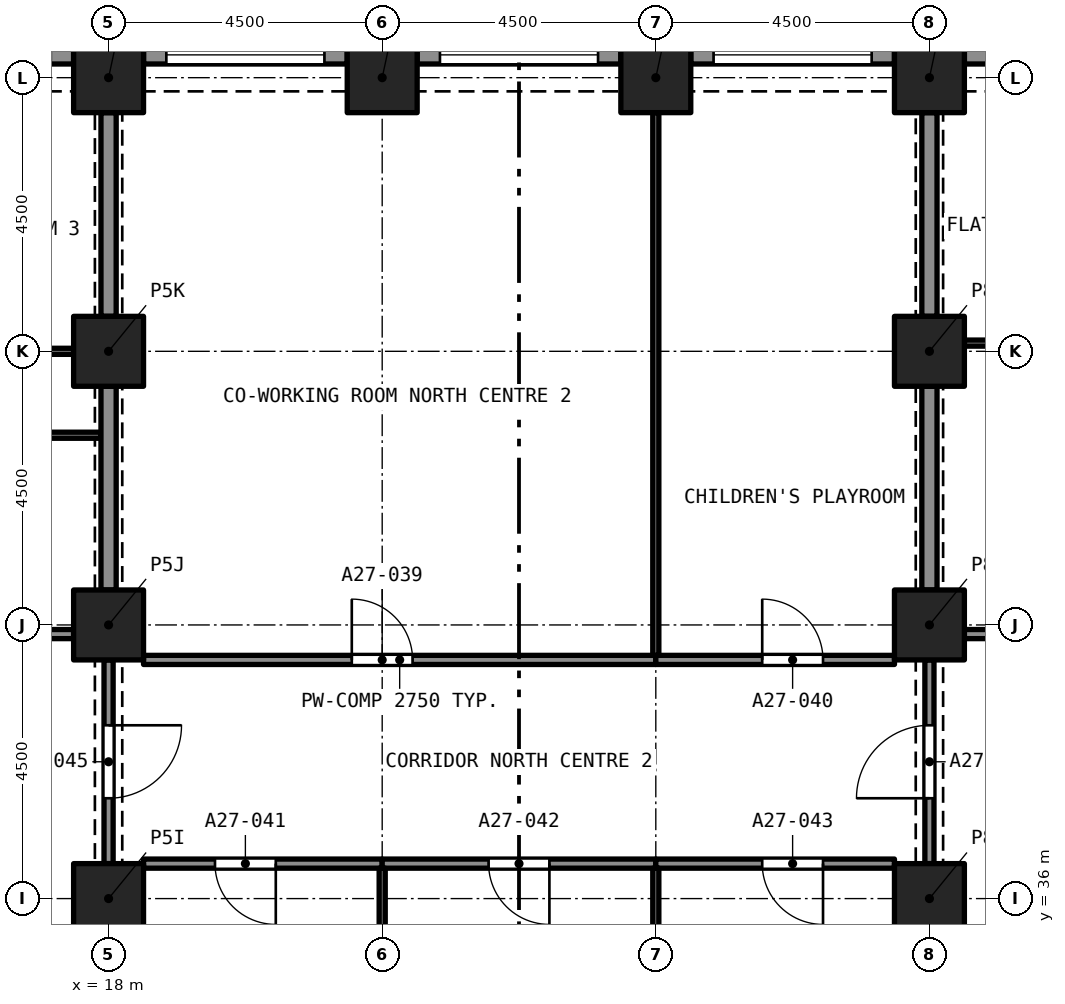
"""IFC4 building model, lengths in metres.
Left out: names, types, materials, properties, quantities, classifications, styles, units other than length and angle.
Written with IfcOpenShell. Run it as: python <this file> out.ifc"""

import sys

from ifc_helpers import new_model, si_unit, direction, frame, frame_2d, origin, origin_2d, place, context, subcontext, project, spatial, rectangle, extrude, element, fill, save


model = new_model("IFC4")
c1 = context("Model", 3, precision=1e-05, world=origin(), true_north=direction((0.0, 1.0)))
c2 = subcontext(c1, "Body", "Model", "MODEL_VIEW")
j1 = project(units=[si_unit("LENGTHUNIT", "METRE"), si_unit("PLANEANGLEUNIT", "RADIAN")], contexts=[c1])
p1 = place(None, origin())
s1 = spatial("IfcSite", under=j1, at=p1, CompositionType="ELEMENT")
p2 = place(p1, origin())
s2 = spatial("IfcBuilding", under=s1, at=p2, CompositionType="ELEMENT")
p3 = place(p2, frame((0.0, 0.0, 99.2)))
s3 = spatial("IfcBuildingStorey", under=s2, at=p3, CompositionType="ELEMENT", Elevation=99.2)
for number, where, z_axis, x_axis in (
    (1, (18.0, 36.0, 0.0), (0.0, 0.0, 1.0), (1.0, 0.0, 0.0)),
    (2, (31.5, 36.0, 0.0), (0.0, 0.0, 1.0), (1.0, 0.0, 0.0)),
    (3, (18.0, 40.5, 0.0), (0.0, 0.0, 1.0), (1.0, 0.0, 0.0)),
    (4, (31.5, 40.5, 0.0), (0.0, 0.0, 1.0), (1.0, 0.0, 0.0)),
    (5, (18.0, 45.0, 0.0), (0.0, 0.0, 1.0), (1.0, 0.0, 0.0)),
    (6, (31.5, 45.0, 0.0), (0.0, 0.0, 1.0), (1.0, 0.0, 0.0)),
    (7, (18.0, 49.5, 0.0), (0.0, 0.0, 1.0), (1.0, 0.0, 0.0)),
    (8, (22.5, 49.5, 0.0), (0.0, 0.0, 1.0), (1.0, 0.0, 0.0)),
    (9, (27.0, 49.5, 0.0), (0.0, 0.0, 1.0), (1.0, 0.0, 0.0)),
    (10, (31.5, 49.5, 0.0), (0.0, 0.0, 1.0), (1.0, 0.0, 0.0)),
):
    element("IfcColumn", number, at=place(p3, frame(where, z_axis=z_axis, x_axis=x_axis)), inside=s3, PredefinedType="COLUMN", context=c2, shape_type="SweptSolid", body=[
        extrude(rectangle(XDim=1.15, YDim=1.15, at=origin_2d()), origin(), (0.0, 0.0, 1.0), 3.2),
    ])
p4 = place(p3, frame((32.075, 49.875, 0.0), z_axis=(0.0, 0.0, 1.0), x_axis=(1.0, 0.0, 0.0)))
e11 = element("IfcWall", 11, at=p4, inside=s3, PredefinedType="SOLIDWALL", context=c2, shape_type="SweptSolid", body=[
    extrude(rectangle(XDim=3.35, YDim=0.3, at=frame_2d((1.675, 0.0))), origin(), (0.0, 0.0, 1.0), 3.2),
])
p5 = place(p4, frame((0.375, 0.0, 0.45)))
e12 = element("IfcOpeningElement", 12, at=p5, cuts=e11, PredefinedType="OPENING", context=c2, shape_type="SweptSolid", body=[
    extrude(rectangle(XDim=2.6, YDim=1.95, at=frame_2d((1.3, 0.975))), frame((0.0, 0.16, 0.0), z_axis=(0.0, -1.0, 0.0), x_axis=(1.0, 0.0, 0.0)), (0.0, 0.0, 1.0), 0.32),
])
p6 = place(p3, frame((27.575, 49.875, 0.0), z_axis=(0.0, 0.0, 1.0), x_axis=(1.0, 0.0, 0.0)))
e13 = element("IfcWall", 13, at=p6, inside=s3, PredefinedType="SOLIDWALL", context=c2, shape_type="SweptSolid", body=[
    extrude(rectangle(XDim=3.35, YDim=0.3, at=frame_2d((1.675, 0.0))), origin(), (0.0, 0.0, 1.0), 3.2),
])
p7 = place(p6, frame((0.375, 0.0, 0.45)))
e14 = element("IfcOpeningElement", 14, at=p7, cuts=e13, PredefinedType="OPENING", context=c2, shape_type="SweptSolid", body=[
    extrude(rectangle(XDim=2.6, YDim=1.95, at=frame_2d((1.3, 0.975))), frame((0.0, 0.16, 0.0), z_axis=(0.0, -1.0, 0.0), x_axis=(1.0, 0.0, 0.0)), (0.0, 0.0, 1.0), 0.32),
])
p8 = place(p3, frame((23.075, 49.875, 0.0), z_axis=(0.0, 0.0, 1.0), x_axis=(1.0, 0.0, 0.0)))
e15 = element("IfcWall", 15, at=p8, inside=s3, PredefinedType="SOLIDWALL", context=c2, shape_type="SweptSolid", body=[
    extrude(rectangle(XDim=3.35, YDim=0.3, at=frame_2d((1.675, 0.0))), origin(), (0.0, 0.0, 1.0), 3.2),
])
p9 = place(p8, frame((0.375, 0.0, 0.45)))
e16 = element("IfcOpeningElement", 16, at=p9, cuts=e15, PredefinedType="OPENING", context=c2, shape_type="SweptSolid", body=[
    extrude(rectangle(XDim=2.6, YDim=1.95, at=frame_2d((1.3, 0.975))), frame((0.0, 0.16, 0.0), z_axis=(0.0, -1.0, 0.0), x_axis=(1.0, 0.0, 0.0)), (0.0, 0.0, 1.0), 0.32),
])
p10 = place(p3, frame((18.575, 49.875, 0.0), z_axis=(0.0, 0.0, 1.0), x_axis=(1.0, 0.0, 0.0)))
e17 = element("IfcWall", 17, at=p10, inside=s3, PredefinedType="SOLIDWALL", context=c2, shape_type="SweptSolid", body=[
    extrude(rectangle(XDim=3.35, YDim=0.3, at=frame_2d((1.675, 0.0))), origin(), (0.0, 0.0, 1.0), 3.2),
])
p11 = place(p10, frame((0.375, 0.0, 0.45)))
e18 = element("IfcOpeningElement", 18, at=p11, cuts=e17, PredefinedType="OPENING", context=c2, shape_type="SweptSolid", body=[
    extrude(rectangle(XDim=2.6, YDim=1.95, at=frame_2d((1.3, 0.975))), frame((0.0, 0.16, 0.0), z_axis=(0.0, -1.0, 0.0), x_axis=(1.0, 0.0, 0.0)), (0.0, 0.0, 1.0), 0.32),
])
p12 = place(p3, frame((14.075, 49.875, 0.0), z_axis=(0.0, 0.0, 1.0), x_axis=(1.0, 0.0, 0.0)))
e19 = element("IfcWall", 19, at=p12, inside=s3, PredefinedType="SOLIDWALL", context=c2, shape_type="SweptSolid", body=[
    extrude(rectangle(XDim=3.35, YDim=0.3, at=frame_2d((1.675, 0.0))), origin(), (0.0, 0.0, 1.0), 3.2),
])
p13 = place(p12, frame((0.375, 0.0, 0.45)))
e20 = element("IfcOpeningElement", 20, at=p13, cuts=e19, PredefinedType="OPENING", context=c2, shape_type="SweptSolid", body=[
    extrude(rectangle(XDim=2.6, YDim=1.95, at=frame_2d((1.3, 0.975))), frame((0.0, 0.16, 0.0), z_axis=(0.0, -1.0, 0.0), x_axis=(1.0, 0.0, 0.0)), (0.0, 0.0, 1.0), 0.32),
])
p14 = place(p3, frame((13.5, 45.0, 0.0), z_axis=(0.0, 0.0, 1.0), x_axis=(1.0, 0.0, 0.0)))
e21 = element("IfcWall", 21, at=p14, inside=s3, PredefinedType="PARTITIONING", context=c2, shape_type="SweptSolid", body=[
    extrude(rectangle(XDim=3.925, YDim=0.1, at=frame_2d((1.962, 0.0))), origin(), (0.0, 0.0, 1.0), 2.9),
])
p15 = place(p14, frame((1.8, 0.0, 0.0)))
e22 = element("IfcOpeningElement", 22, at=p15, cuts=e21, PredefinedType="OPENING", context=c2, shape_type="SweptSolid", body=[
    extrude(rectangle(XDim=0.9, YDim=2.1, at=frame_2d((0.45, 1.05))), frame((0.0, 0.06, 0.0), z_axis=(0.0, -1.0, 0.0), x_axis=(1.0, 0.0, 0.0)), (0.0, 0.0, 1.0), 0.12),
])
p16 = place(p3, frame((18.0, 45.575, 0.0), z_axis=(0.0, 0.0, 1.0), x_axis=(0.0, 1.0, 0.0)))
e23 = element("IfcWall", 23, at=p16, inside=s3, PredefinedType="PARTITIONING", context=c2, shape_type="SweptSolid", body=[
    extrude(rectangle(XDim=3.35, YDim=0.25, at=frame_2d((1.675, 0.0))), origin(), (0.0, 0.0, 1.0), 2.38),
])
p17 = place(p3, frame((17.875, 43.62, 0.0), z_axis=(0.0, 0.0, 1.0), x_axis=(-1.0, 0.0, 0.0)))
e24 = element("IfcWall", 24, at=p17, inside=s3, PredefinedType="PARTITIONING", context=c2, shape_type="SweptSolid", body=[
    extrude(rectangle(XDim=6.23, YDim=0.1, at=frame_2d((3.115, 0.0))), origin(), (0.0, 0.0, 1.0), 2.9),
])
p18 = place(p17, frame((2.602, 0.0, 0.0)))
e25 = element("IfcOpeningElement", 25, at=p18, cuts=e24, PredefinedType="OPENING", context=c2, shape_type="SweptSolid", body=[
    extrude(rectangle(XDim=0.9, YDim=2.1, at=frame_2d((0.45, 1.05))), frame((0.0, 0.06, 0.0), z_axis=(0.0, -1.0, 0.0), x_axis=(1.0, 0.0, 0.0)), (0.0, 0.0, 1.0), 0.12),
])
p19 = place(p3, frame((18.0, 41.075, 0.0), z_axis=(0.0, 0.0, 1.0), x_axis=(0.0, 1.0, 0.0)))
e26 = element("IfcWall", 26, at=p19, inside=s3, PredefinedType="PARTITIONING", context=c2, shape_type="SweptSolid", body=[
    extrude(rectangle(XDim=3.35, YDim=0.25, at=frame_2d((1.675, 0.0))), origin(), (0.0, 0.0, 1.0), 2.38),
])
p20 = place(p3, frame((13.35, 40.35, 0.0), z_axis=(0.0, 0.0, 1.0), x_axis=(1.0, 0.0, 0.0)))
e27 = element("IfcWall", 27, at=p20, inside=s3, PredefinedType="PARTITIONING", context=c2, shape_type="SweptSolid", body=[
    extrude(rectangle(XDim=4.075, YDim=0.15, at=frame_2d((2.038, 0.0))), origin(), (0.0, 0.0, 1.0), 2.9),
])
p21 = place(p3, frame((32.075, 45.135, 0.0), z_axis=(0.0, 0.0, 1.0), x_axis=(1.0, 0.0, 0.0)))
e28 = element("IfcWall", 28, at=p21, inside=s3, PredefinedType="PARTITIONING", context=c2, shape_type="SweptSolid", body=[
    extrude(rectangle(XDim=3.925, YDim=0.1, at=frame_2d((1.962, 0.0))), origin(), (0.0, 0.0, 1.0), 2.9),
])
p22 = place(p21, frame((1.175, 0.0, 0.0)))
e29 = element("IfcOpeningElement", 29, at=p22, cuts=e28, PredefinedType="OPENING", context=c2, shape_type="SweptSolid", body=[
    extrude(rectangle(XDim=1.0, YDim=2.1, at=frame_2d((0.5, 1.05))), frame((0.0, 0.06, 0.0), z_axis=(0.0, -1.0, 0.0), x_axis=(1.0, 0.0, 0.0)), (0.0, 0.0, 1.0), 0.12),
])
p23 = place(p3, frame((31.5, 41.075, 0.0), z_axis=(0.0, 0.0, 1.0), x_axis=(0.0, 1.0, 0.0)))
e30 = element("IfcWall", 30, at=p23, inside=s3, PredefinedType="PARTITIONING", context=c2, shape_type="SweptSolid", body=[
    extrude(rectangle(XDim=3.35, YDim=0.25, at=frame_2d((1.675, 0.0))), origin(), (0.0, 0.0, 1.0), 2.38),
])
p24 = place(p3, frame((32.075, 40.35, 0.0), z_axis=(0.0, 0.0, 1.0), x_axis=(1.0, 0.0, 0.0)))
e31 = element("IfcWall", 31, at=p24, inside=s3, PredefinedType="PARTITIONING", context=c2, shape_type="SweptSolid", body=[
    extrude(rectangle(XDim=2.275, YDim=0.15, at=frame_2d((1.138, 0.0))), origin(), (0.0, 0.0, 1.0), 2.9),
])
p25 = place(p24, frame((1.145, 0.0, 0.0)))
e32 = element("IfcOpeningElement", 32, at=p25, cuts=e31, PredefinedType="OPENING", context=c2, shape_type="SweptSolid", body=[
    extrude(rectangle(XDim=1.0, YDim=2.1, at=frame_2d((0.5, 1.05))), frame((0.0, 0.085, 0.0), z_axis=(0.0, -1.0, 0.0), x_axis=(1.0, 0.0, 0.0)), (0.0, 0.0, 1.0), 0.17),
])
p26 = place(p3, frame((31.5, 45.575, 0.0), z_axis=(0.0, 0.0, 1.0), x_axis=(0.0, 1.0, 0.0)))
e33 = element("IfcWall", 33, at=p26, inside=s3, PredefinedType="PARTITIONING", context=c2, shape_type="SweptSolid", body=[
    extrude(rectangle(XDim=3.35, YDim=0.25, at=frame_2d((1.675, 0.0))), origin(), (0.0, 0.0, 1.0), 2.38),
])
p27 = place(p3, frame((18.575, 39.925, 0.0), z_axis=(0.0, 0.0, 1.0), x_axis=(1.0, 0.0, 0.0)))
e34 = element("IfcWall", 34, at=p27, inside=s3, PredefinedType="PARTITIONING", context=c2, shape_type="SweptSolid", body=[
    extrude(rectangle(XDim=8.425, YDim=0.15, at=frame_2d((4.212, 0.0))), origin(), (0.0, 0.0, 1.0), 2.75),
])
p28 = place(p27, frame((3.425, 0.0, 0.0)))
e35 = element("IfcOpeningElement", 35, at=p28, cuts=e34, PredefinedType="OPENING", context=c2, shape_type="SweptSolid", body=[
    extrude(rectangle(XDim=1.0, YDim=2.1, at=frame_2d((0.5, 1.05))), frame((0.0, 0.085, 0.0), z_axis=(0.0, -1.0, 0.0), x_axis=(1.0, 0.0, 0.0)), (0.0, 0.0, 1.0), 0.17),
])
p29 = place(p3, frame((27.0, 39.925, 0.0), z_axis=(0.0, 0.0, 1.0), x_axis=(1.0, 0.0, 0.0)))
e36 = element("IfcWall", 36, at=p29, inside=s3, PredefinedType="PARTITIONING", context=c2, shape_type="SweptSolid", body=[
    extrude(rectangle(XDim=3.925, YDim=0.15, at=frame_2d((1.962, 0.0))), origin(), (0.0, 0.0, 1.0), 2.75),
])
p30 = place(p29, frame((1.75, 0.0, 0.0)))
e37 = element("IfcOpeningElement", 37, at=p30, cuts=e36, PredefinedType="OPENING", context=c2, shape_type="SweptSolid", body=[
    extrude(rectangle(XDim=1.0, YDim=2.1, at=frame_2d((0.5, 1.05))), frame((0.0, 0.085, 0.0), z_axis=(0.0, -1.0, 0.0), x_axis=(1.0, 0.0, 0.0)), (0.0, 0.0, 1.0), 0.17),
])
p31 = place(p3, frame((22.5, 36.575, 0.0), z_axis=(0.0, 0.0, 1.0), x_axis=(-1.0, 0.0, 0.0)))
e38 = element("IfcWall", 38, at=p31, inside=s3, PredefinedType="PARTITIONING", context=c2, shape_type="SweptSolid", body=[
    extrude(rectangle(XDim=3.925, YDim=0.15, at=frame_2d((1.962, 0.0))), origin(), (0.0, 0.0, 1.0), 2.75),
])
p32 = place(p31, frame((1.75, 0.0, 0.0)))
e39 = element("IfcOpeningElement", 39, at=p32, cuts=e38, PredefinedType="OPENING", context=c2, shape_type="SweptSolid", body=[
    extrude(rectangle(XDim=1.0, YDim=2.1, at=frame_2d((0.5, 1.05))), frame((0.0, 0.085, 0.0), z_axis=(0.0, -1.0, 0.0), x_axis=(1.0, 0.0, 0.0)), (0.0, 0.0, 1.0), 0.17),
])
p33 = place(p3, frame((27.0, 36.575, 0.0), z_axis=(0.0, 0.0, 1.0), x_axis=(-1.0, 0.0, 0.0)))
e40 = element("IfcWall", 40, at=p33, inside=s3, PredefinedType="PARTITIONING", context=c2, shape_type="SweptSolid", body=[
    extrude(rectangle(XDim=4.5, YDim=0.15, at=frame_2d((2.25, 0.0))), origin(), (0.0, 0.0, 1.0), 2.75),
])
p34 = place(p33, frame((1.75, 0.0, 0.0)))
e41 = element("IfcOpeningElement", 41, at=p34, cuts=e40, PredefinedType="OPENING", context=c2, shape_type="SweptSolid", body=[
    extrude(rectangle(XDim=1.0, YDim=2.1, at=frame_2d((0.5, 1.05))), frame((0.0, 0.085, 0.0), z_axis=(0.0, -1.0, 0.0), x_axis=(1.0, 0.0, 0.0)), (0.0, 0.0, 1.0), 0.17),
])
p35 = place(p3, frame((30.925, 36.575, 0.0), z_axis=(0.0, 0.0, 1.0), x_axis=(-1.0, 0.0, 0.0)))
e42 = element("IfcWall", 42, at=p35, inside=s3, PredefinedType="PARTITIONING", context=c2, shape_type="SweptSolid", body=[
    extrude(rectangle(XDim=3.925, YDim=0.15, at=frame_2d((1.962, 0.0))), origin(), (0.0, 0.0, 1.0), 2.75),
])
p36 = place(p35, frame((1.175, 0.0, 0.0)))
e43 = element("IfcOpeningElement", 43, at=p36, cuts=e42, PredefinedType="OPENING", context=c2, shape_type="SweptSolid", body=[
    extrude(rectangle(XDim=1.0, YDim=2.1, at=frame_2d((0.5, 1.05))), frame((0.0, 0.085, 0.0), z_axis=(0.0, -1.0, 0.0), x_axis=(1.0, 0.0, 0.0)), (0.0, 0.0, 1.0), 0.17),
])
p37 = place(p3, frame((31.5, 36.575, 0.0), z_axis=(0.0, 0.0, 1.0), x_axis=(0.0, 1.0, 0.0)))
e44 = element("IfcWall", 44, at=p37, inside=s3, PredefinedType="PARTITIONING", context=c2, shape_type="SweptSolid", body=[
    extrude(rectangle(XDim=3.35, YDim=0.15, at=frame_2d((1.675, 0.0))), origin(), (0.0, 0.0, 1.0), 2.38),
])
p38 = place(p37, frame((1.075, 0.0, 0.0)))
e45 = element("IfcOpeningElement", 45, at=p38, cuts=e44, PredefinedType="OPENING", context=c2, shape_type="SweptSolid", body=[
    extrude(rectangle(XDim=1.2, YDim=2.1, at=frame_2d((0.6, 1.05))), frame((0.0, 0.085, 0.0), z_axis=(0.0, -1.0, 0.0), x_axis=(1.0, 0.0, 0.0)), (0.0, 0.0, 1.0), 0.17),
])
p39 = place(p3, frame((18.0, 39.925, 0.0), z_axis=(0.0, 0.0, 1.0), x_axis=(0.0, -1.0, 0.0)))
e46 = element("IfcWall", 46, at=p39, inside=s3, PredefinedType="PARTITIONING", context=c2, shape_type="SweptSolid", body=[
    extrude(rectangle(XDim=3.35, YDim=0.15, at=frame_2d((1.675, 0.0))), origin(), (0.0, 0.0, 1.0), 2.38),
])
p40 = place(p39, frame((1.075, 0.0, 0.0)))
e47 = element("IfcOpeningElement", 47, at=p40, cuts=e46, PredefinedType="OPENING", context=c2, shape_type="SweptSolid", body=[
    extrude(rectangle(XDim=1.2, YDim=2.1, at=frame_2d((0.6, 1.05))), frame((0.0, 0.085, 0.0), z_axis=(0.0, -1.0, 0.0), x_axis=(1.0, 0.0, 0.0)), (0.0, 0.0, 1.0), 0.17),
])
p41 = place(p3, frame((27.0, 40.0, 0.0), z_axis=(0.0, 0.0, 1.0), x_axis=(0.0, 1.0, 0.0)))
e48 = element("IfcWall", 48, at=p41, inside=s3, PredefinedType="PARTITIONING", context=c2, shape_type="SweptSolid", body=[
    extrude(rectangle(XDim=8.925, YDim=0.1, at=frame_2d((4.462, 0.0))), origin(), (0.0, 0.0, 1.0), 2.75),
])
for number, where, z_axis, x_axis in (
    (49, (22.5, 26.375, 0.0), (0.0, 0.0, 1.0), (0.0, 1.0, 0.0)),
    (50, (27.0, 26.375, 0.0), (0.0, 0.0, 1.0), (0.0, 1.0, 0.0)),
):
    element("IfcWall", number, at=place(p3, frame(where, z_axis=z_axis, x_axis=x_axis)), inside=s3, PredefinedType="PARTITIONING", context=c2, shape_type="SweptSolid", body=[
        extrude(rectangle(XDim=10.125, YDim=0.1, at=frame_2d((5.062, 0.0))), origin(), (0.0, 0.0, 1.0), 2.75),
    ])
p42 = place(p7, origin())
e51 = element("IfcWindow", 51, at=p42, inside=s3, PartitioningType="SINGLE_PANEL", PredefinedType="WINDOW", context=c2, shape_type="SweptSolid", body=[
    extrude(rectangle(XDim=2.6, YDim=1.95, at=frame_2d((1.3, 0.975))), frame((0.0, 0.03, 0.0), z_axis=(0.0, -1.0, 0.0), x_axis=(1.0, 0.0, 0.0)), (0.0, 0.0, 1.0), 0.06),
])
fill(e14, e51)
p43 = place(p9, origin())
e52 = element("IfcWindow", 52, at=p43, inside=s3, PartitioningType="SINGLE_PANEL", PredefinedType="WINDOW", context=c2, shape_type="SweptSolid", body=[
    extrude(rectangle(XDim=2.6, YDim=1.95, at=frame_2d((1.3, 0.975))), frame((0.0, 0.03, 0.0), z_axis=(0.0, -1.0, 0.0), x_axis=(1.0, 0.0, 0.0)), (0.0, 0.0, 1.0), 0.06),
])
fill(e16, e52)
p44 = place(p11, origin())
e53 = element("IfcWindow", 53, at=p44, inside=s3, PartitioningType="SINGLE_PANEL", PredefinedType="WINDOW", context=c2, shape_type="SweptSolid", body=[
    extrude(rectangle(XDim=2.6, YDim=1.95, at=frame_2d((1.3, 0.975))), frame((0.0, 0.03, 0.0), z_axis=(0.0, -1.0, 0.0), x_axis=(1.0, 0.0, 0.0)), (0.0, 0.0, 1.0), 0.06),
])
fill(e18, e53)
p45 = place(p28, origin())
e54 = element("IfcDoor", 54, at=p45, inside=s3, OperationType="SINGLE_SWING_LEFT", PredefinedType="DOOR", context=c2, shape_type="SweptSolid", body=[
    extrude(rectangle(XDim=1.0, YDim=2.1, at=frame_2d((0.5, 1.05))), frame((0.0, 0.025, 0.0), z_axis=(0.0, -1.0, 0.0), x_axis=(1.0, 0.0, 0.0)), (0.0, 0.0, 1.0), 0.05),
])
fill(e35, e54)
p46 = place(p30, origin())
e55 = element("IfcDoor", 55, at=p46, inside=s3, OperationType="SINGLE_SWING_RIGHT", PredefinedType="DOOR", context=c2, shape_type="SweptSolid", body=[
    extrude(rectangle(XDim=1.0, YDim=2.1, at=frame_2d((0.5, 1.05))), frame((0.0, 0.025, 0.0), z_axis=(0.0, -1.0, 0.0), x_axis=(1.0, 0.0, 0.0)), (0.0, 0.0, 1.0), 0.05),
])
fill(e37, e55)
p47 = place(p32, origin())
e56 = element("IfcDoor", 56, at=p47, inside=s3, OperationType="SINGLE_SWING_RIGHT", PredefinedType="DOOR", context=c2, shape_type="SweptSolid", body=[
    extrude(rectangle(XDim=1.0, YDim=2.1, at=frame_2d((0.5, 1.05))), frame((0.0, 0.025, 0.0), z_axis=(0.0, -1.0, 0.0), x_axis=(1.0, 0.0, 0.0)), (0.0, 0.0, 1.0), 0.05),
])
fill(e39, e56)
p48 = place(p34, origin())
e57 = element("IfcDoor", 57, at=p48, inside=s3, OperationType="SINGLE_SWING_RIGHT", PredefinedType="DOOR", context=c2, shape_type="SweptSolid", body=[
    extrude(rectangle(XDim=1.0, YDim=2.1, at=frame_2d((0.5, 1.05))), frame((0.0, 0.025, 0.0), z_axis=(0.0, -1.0, 0.0), x_axis=(1.0, 0.0, 0.0)), (0.0, 0.0, 1.0), 0.05),
])
fill(e41, e57)
p49 = place(p36, origin())
e58 = element("IfcDoor", 58, at=p49, inside=s3, OperationType="SINGLE_SWING_LEFT", PredefinedType="DOOR", context=c2, shape_type="SweptSolid", body=[
    extrude(rectangle(XDim=1.0, YDim=2.1, at=frame_2d((0.5, 1.05))), frame((0.0, 0.025, 0.0), z_axis=(0.0, -1.0, 0.0), x_axis=(1.0, 0.0, 0.0)), (0.0, 0.0, 1.0), 0.05),
])
fill(e43, e58)
p50 = place(p38, origin())
e59 = element("IfcDoor", 59, at=p50, inside=s3, OperationType="SINGLE_SWING_LEFT", PredefinedType="DOOR", context=c2, shape_type="SweptSolid", body=[
    extrude(rectangle(XDim=1.2, YDim=2.1, at=frame_2d((0.6, 1.05))), frame((0.0, 0.025, 0.0), z_axis=(0.0, -1.0, 0.0), x_axis=(1.0, 0.0, 0.0)), (0.0, 0.0, 1.0), 0.05),
])
fill(e45, e59)
p51 = place(p40, origin())
e60 = element("IfcDoor", 60, at=p51, inside=s3, OperationType="SINGLE_SWING_LEFT", PredefinedType="DOOR", context=c2, shape_type="SweptSolid", body=[
    extrude(rectangle(XDim=1.2, YDim=2.1, at=frame_2d((0.6, 1.05))), frame((0.0, 0.025, 0.0), z_axis=(0.0, -1.0, 0.0), x_axis=(1.0, 0.0, 0.0)), (0.0, 0.0, 1.0), 0.05),
])
fill(e47, e60)
save(model, sys.argv[1])
